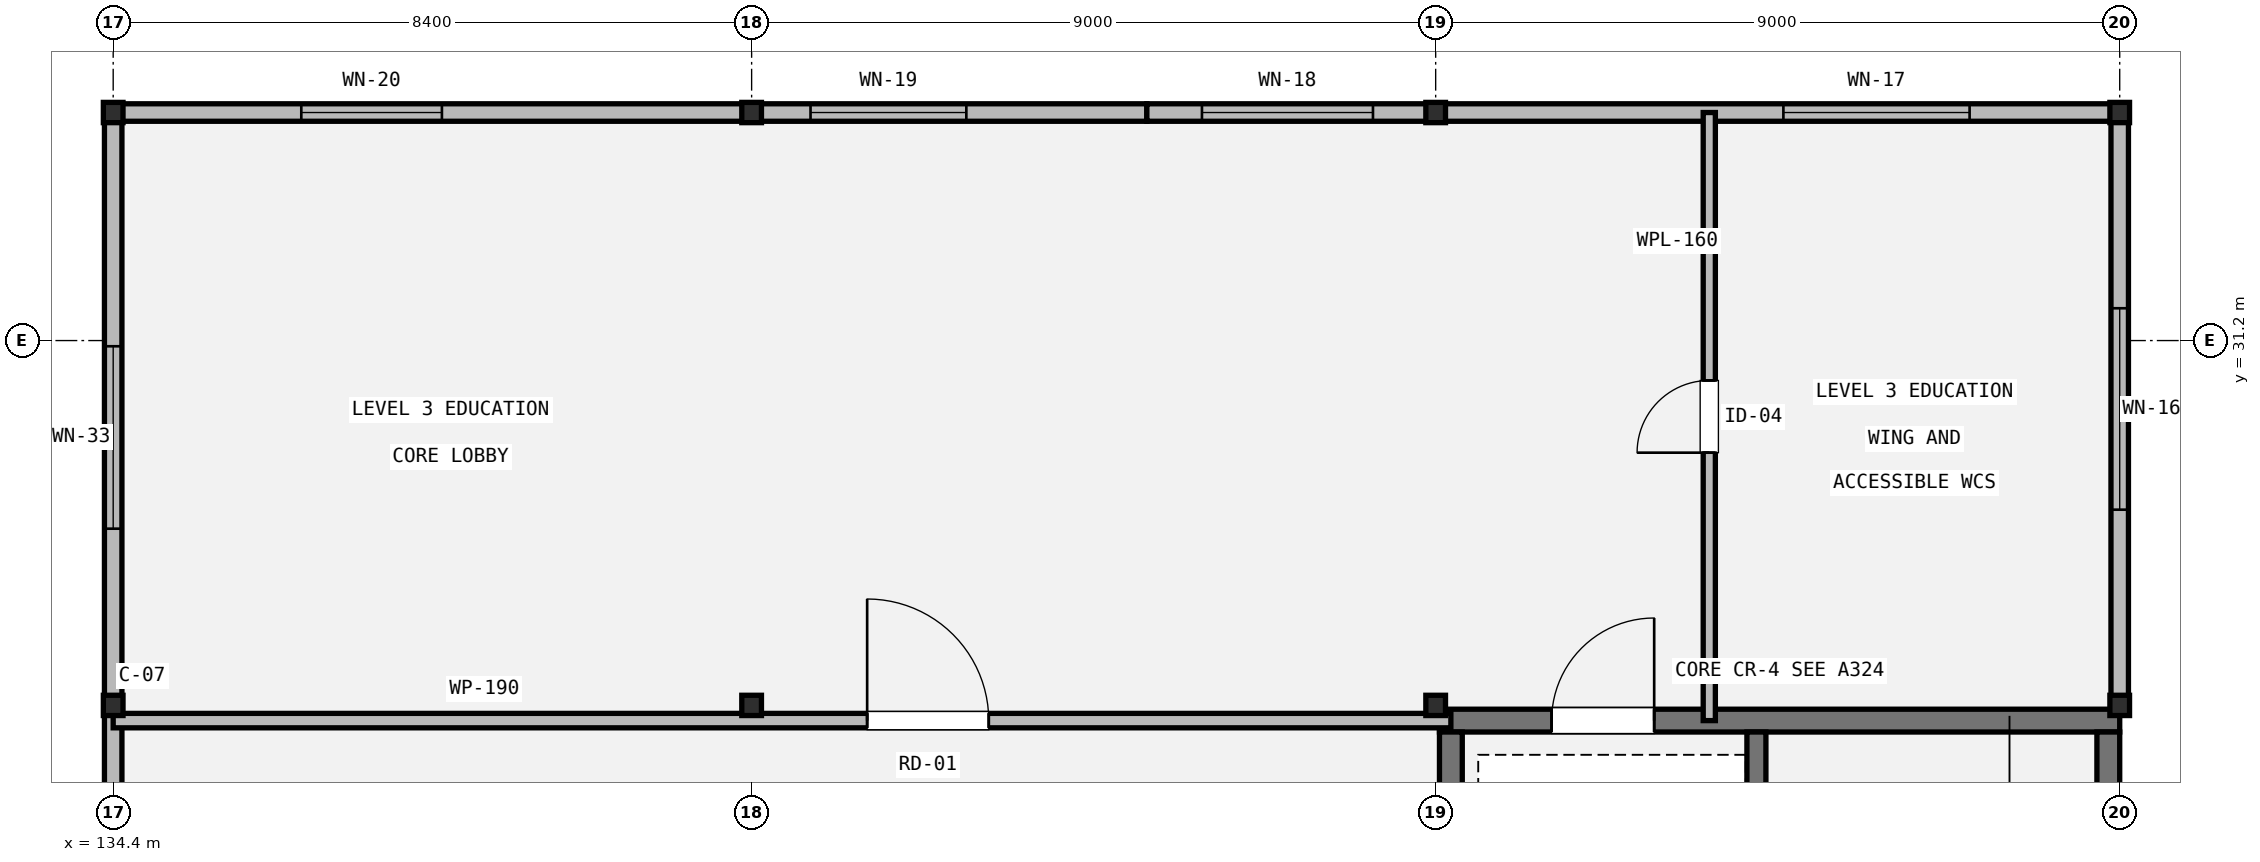
"""IFC4 building model, lengths in metres.
Left out: names, types, materials, properties, quantities, classifications, styles, units other than length and angle.
Written with IfcOpenShell. Run it as: python <this file> out.ifc"""

import sys

from ifc_helpers import new_model, si_unit, direction, frame, frame_2d, origin, origin_2d, place, context, subcontext, project, spatial, rectangle, i_section, extrude, element, fill, save


model = new_model("IFC4")
c1 = context("Model", 3, precision=1e-05, world=origin(), true_north=direction((0.0, 1.0)))
c2 = subcontext(c1, "Body", "Model", "MODEL_VIEW")
j1 = project(units=[si_unit("LENGTHUNIT", "METRE"), si_unit("PLANEANGLEUNIT", "RADIAN")], contexts=[c1])
p1 = place(None, origin())
s1 = spatial("IfcSite", under=j1, at=p1, CompositionType="ELEMENT")
p2 = place(p1, origin())
s2 = spatial("IfcBuilding", under=s1, at=p2, CompositionType="ELEMENT")
p3 = place(p2, frame((0.0, 0.0, 15.0)))
s3 = spatial("IfcBuildingStorey", under=s2, at=p3, CompositionType="ELEMENT", Elevation=15.0)
for number, where, z_axis, x_axis in (
    (1, (134.4, 26.4, 0.0), (0.0, 0.0, 1.0), (1.0, 0.0, 0.0)),
    (2, (134.4, 34.2, 0.0), (0.0, 0.0, 1.0), (1.0, 0.0, 0.0)),
    (3, (142.8, 26.4, 0.0), (0.0, 0.0, 1.0), (1.0, 0.0, 0.0)),
    (4, (142.8, 34.2, 0.0), (0.0, 0.0, 1.0), (1.0, 0.0, 0.0)),
    (5, (151.8, 26.4, 0.0), (0.0, 0.0, 1.0), (1.0, 0.0, 0.0)),
    (6, (151.8, 34.2, 0.0), (0.0, 0.0, 1.0), (1.0, 0.0, 0.0)),
    (7, (160.8, 26.4, 0.0), (0.0, 0.0, 1.0), (1.0, 0.0, 0.0)),
    (8, (160.8, 34.2, 0.0), (0.0, 0.0, 1.0), (1.0, 0.0, 0.0)),
):
    element("IfcColumn", number, at=place(p3, frame(where, z_axis=z_axis, x_axis=x_axis)), inside=s3, PredefinedType="COLUMN", context=c2, shape_type="SweptSolid", body=[
        extrude(i_section(OverallWidth=0.259, OverallDepth=0.267, WebThickness=0.013, FlangeThickness=0.021, FilletRadius=0.013, at=origin_2d()), origin(), (0.0, 0.0, 1.0), 4.2),
    ])
p4 = place(p3, frame((134.4, 17.1, 0.0), z_axis=(0.0, 0.0, 1.0), x_axis=(0.0, 1.0, 0.0)))
e9 = element("IfcWall", 9, at=p4, inside=s3, PredefinedType="STANDARD", context=c2, shape_type="SweptSolid", body=[
    extrude(rectangle(XDim=17.1, YDim=0.23, at=frame_2d((8.55, 0.0))), origin(), (0.0, 0.0, 1.0), 3.952),
])
p5 = place(p4, frame((3.2, 0.0, 0.9)))
e10 = element("IfcOpeningElement", 10, at=p5, cuts=e9, PredefinedType="OPENING", context=c2, shape_type="SweptSolid", body=[
    extrude(rectangle(XDim=2.15, YDim=1.65, at=frame_2d((1.075, 0.825))), frame((0.0, 0.125, 0.0), z_axis=(0.0, -1.0, 0.0), x_axis=(1.0, 0.0, 0.0)), (0.0, 0.0, 1.0), 0.25),
])
p6 = place(p4, frame((11.625, 0.0, 0.9)))
e11 = element("IfcOpeningElement", 11, at=p6, cuts=e9, PredefinedType="OPENING", context=c2, shape_type="SweptSolid", body=[
    extrude(rectangle(XDim=2.4, YDim=1.65, at=frame_2d((1.2, 0.825))), frame((0.0, 0.125, 0.0), z_axis=(0.0, -1.0, 0.0), x_axis=(1.0, 0.0, 0.0)), (0.0, 0.0, 1.0), 0.25),
])
p7 = place(p3, frame((134.4, 34.2, 0.0), z_axis=(0.0, 0.0, 1.0), x_axis=(1.0, 0.0, 0.0)))
e12 = element("IfcWall", 12, at=p7, inside=s3, PredefinedType="STANDARD", context=c2, shape_type="SweptSolid", body=[
    extrude(rectangle(XDim=13.6, YDim=0.23, at=frame_2d((6.8, 0.0))), origin(), (0.0, 0.0, 1.0), 3.952),
])
p8 = place(p7, frame((2.475, 0.0, 0.9)))
e13 = element("IfcOpeningElement", 13, at=p8, cuts=e12, PredefinedType="OPENING", context=c2, shape_type="SweptSolid", body=[
    extrude(rectangle(XDim=1.85, YDim=2.1, at=frame_2d((0.925, 1.05))), frame((0.0, 0.125, 0.0), z_axis=(0.0, -1.0, 0.0), x_axis=(1.0, 0.0, 0.0)), (0.0, 0.0, 1.0), 0.25),
])
p9 = place(p7, frame((9.175, 0.0, 0.9)))
e14 = element("IfcOpeningElement", 14, at=p9, cuts=e12, PredefinedType="OPENING", context=c2, shape_type="SweptSolid", body=[
    extrude(rectangle(XDim=2.05, YDim=2.1, at=frame_2d((1.025, 1.05))), frame((0.0, 0.125, 0.0), z_axis=(0.0, -1.0, 0.0), x_axis=(1.0, 0.0, 0.0)), (0.0, 0.0, 1.0), 0.25),
])
p10 = place(p3, frame((148.0, 34.2, 0.0), z_axis=(0.0, 0.0, 1.0), x_axis=(1.0, 0.0, 0.0)))
e15 = element("IfcWall", 15, at=p10, inside=s3, PredefinedType="STANDARD", context=c2, shape_type="SweptSolid", body=[
    extrude(rectangle(XDim=12.8, YDim=0.23, at=frame_2d((6.4, 0.0))), origin(), (0.0, 0.0, 1.0), 3.952),
])
p11 = place(p10, frame((0.725, 0.0, 0.9)))
e16 = element("IfcOpeningElement", 16, at=p11, cuts=e15, PredefinedType="OPENING", context=c2, shape_type="SweptSolid", body=[
    extrude(rectangle(XDim=2.25, YDim=2.1, at=frame_2d((1.125, 1.05))), frame((0.0, 0.125, 0.0), z_axis=(0.0, -1.0, 0.0), x_axis=(1.0, 0.0, 0.0)), (0.0, 0.0, 1.0), 0.25),
])
p12 = place(p10, frame((8.375, 0.0, 0.9)))
e17 = element("IfcOpeningElement", 17, at=p12, cuts=e15, PredefinedType="OPENING", context=c2, shape_type="SweptSolid", body=[
    extrude(rectangle(XDim=2.45, YDim=2.1, at=frame_2d((1.225, 1.05))), frame((0.0, 0.125, 0.0), z_axis=(0.0, -1.0, 0.0), x_axis=(1.0, 0.0, 0.0)), (0.0, 0.0, 1.0), 0.25),
])
p13 = place(p3, frame((160.8, 34.2, 0.0), z_axis=(0.0, 0.0, 1.0), x_axis=(0.0, -1.0, 0.0)))
e18 = element("IfcWall", 18, at=p13, inside=s3, PredefinedType="STANDARD", context=c2, shape_type="SweptSolid", body=[
    extrude(rectangle(XDim=7.8, YDim=0.23, at=frame_2d((3.9, 0.0))), origin(), (0.0, 0.0, 1.0), 3.952),
])
p14 = place(p13, frame((2.575, 0.0, 0.9)))
e19 = element("IfcOpeningElement", 19, at=p14, cuts=e18, PredefinedType="OPENING", context=c2, shape_type="SweptSolid", body=[
    extrude(rectangle(XDim=2.65, YDim=2.1, at=frame_2d((1.325, 1.05))), frame((0.0, 0.125, 0.0), z_axis=(0.0, -1.0, 0.0), x_axis=(1.0, 0.0, 0.0)), (0.0, 0.0, 1.0), 0.25),
])
p15 = place(p3, frame((151.85, 26.2, 0.0), z_axis=(0.0, 0.0, 1.0), x_axis=(1.0, 0.0, 0.0)))
e20 = element("IfcWall", 20, at=p15, inside=s3, PredefinedType="SHEAR", context=c2, shape_type="SweptSolid", body=[
    extrude(rectangle(XDim=8.95, YDim=0.3, at=frame_2d((4.475, 0.0))), origin(), (0.0, 0.0, 1.0), 4.0),
])
p16 = place(p15, frame((1.475, 0.0, 0.0)))
e21 = element("IfcOpeningElement", 21, at=p16, cuts=e20, PredefinedType="OPENING", context=c2, shape_type="SweptSolid", body=[
    extrude(rectangle(XDim=1.35, YDim=2.15, at=frame_2d((0.675, 1.075))), frame((0.0, 0.16, 0.0), z_axis=(0.0, -1.0, 0.0), x_axis=(1.0, 0.0, 0.0)), (0.0, 0.0, 1.0), 0.32),
])
for number, where, z_axis, x_axis in (
    (22, (152.0, 15.75, 0.0), (0.0, 0.0, 1.0), (0.0, 1.0, 0.0)),
    (23, (160.65, 26.05, 0.0), (0.0, 0.0, 1.0), (0.0, -1.0, 0.0)),
):
    element("IfcWall", number, at=place(p3, frame(where, z_axis=z_axis, x_axis=x_axis)), inside=s3, PredefinedType="SHEAR", context=c2, shape_type="SweptSolid", body=[
        extrude(rectangle(XDim=10.3, YDim=0.3, at=frame_2d((5.15, 0.0))), origin(), (0.0, 0.0, 1.0), 4.0),
    ])
p17 = place(p3, frame((156.02, 26.05, 0.0), z_axis=(0.0, 0.0, 1.0), x_axis=(0.0, -1.0, 0.0)))
e24 = element("IfcWall", 24, at=p17, inside=s3, PredefinedType="SHEAR", context=c2, shape_type="SweptSolid", body=[
    extrude(rectangle(XDim=10.3, YDim=0.25, at=frame_2d((5.15, 0.0))), origin(), (0.0, 0.0, 1.0), 4.0),
])
p18 = place(p17, frame((8.65, 0.0, 0.0)))
e25 = element("IfcOpeningElement", 25, at=p18, cuts=e24, PredefinedType="OPENING", context=c2, shape_type="SweptSolid", body=[
    extrude(rectangle(XDim=1.1, YDim=2.15, at=frame_2d((0.55, 1.075))), frame((0.0, 0.135, 0.0), z_axis=(0.0, -1.0, 0.0), x_axis=(1.0, 0.0, 0.0)), (0.0, 0.0, 1.0), 0.27),
])
p19 = place(p3, frame((134.4, 26.2, 0.0), z_axis=(0.0, 0.0, 1.0), x_axis=(1.0, 0.0, 0.0)))
e26 = element("IfcWall", 26, at=p19, inside=s3, PredefinedType="PARTITIONING", context=c2, shape_type="SweptSolid", body=[
    extrude(rectangle(XDim=17.6, YDim=0.19, at=frame_2d((8.8, 0.0))), origin(), (0.0, 0.0, 1.0), 3.952),
])
p20 = place(p19, frame((9.92, 0.0, 0.0)))
e27 = element("IfcOpeningElement", 27, at=p20, cuts=e26, PredefinedType="OPENING", context=c2, shape_type="SweptSolid", body=[
    extrude(rectangle(XDim=1.6, YDim=2.25, at=frame_2d((0.8, 1.125))), frame((0.0, 0.105, 0.0), z_axis=(0.0, -1.0, 0.0), x_axis=(1.0, 0.0, 0.0)), (0.0, 0.0, 1.0), 0.21),
])
p21 = place(p3, frame((155.4, 26.2, 0.0), z_axis=(0.0, 0.0, 1.0), x_axis=(0.0, 1.0, 0.0)))
e28 = element("IfcWall", 28, at=p21, inside=s3, PredefinedType="PLUMBINGWALL", context=c2, shape_type="SweptSolid", body=[
    extrude(rectangle(XDim=8.0, YDim=0.16, at=frame_2d((4.0, 0.0))), origin(), (0.0, 0.0, 1.0), 3.952),
])
p22 = place(p21, frame((3.525, 0.0, 0.0)))
e29 = element("IfcOpeningElement", 29, at=p22, cuts=e28, PredefinedType="OPENING", context=c2, shape_type="SweptSolid", body=[
    extrude(rectangle(XDim=0.95, YDim=2.1, at=frame_2d((0.475, 1.05))), frame((0.0, 0.09, 0.0), z_axis=(0.0, -1.0, 0.0), x_axis=(1.0, 0.0, 0.0)), (0.0, 0.0, 1.0), 0.18),
])
p23 = place(p6, origin())
e30 = element("IfcWindow", 30, at=p23, inside=s3, PartitioningType="SINGLE_PANEL", PredefinedType="WINDOW", context=c2, shape_type="SweptSolid", body=[
    extrude(rectangle(XDim=2.4, YDim=1.65, at=frame_2d((1.2, 0.825))), frame((0.0, 0.03, 0.0), z_axis=(0.0, -1.0, 0.0), x_axis=(1.0, 0.0, 0.0)), (0.0, 0.0, 1.0), 0.06),
])
fill(e11, e30)
p24 = place(p8, origin())
e31 = element("IfcWindow", 31, at=p24, inside=s3, PartitioningType="SINGLE_PANEL", PredefinedType="WINDOW", context=c2, shape_type="SweptSolid", body=[
    extrude(rectangle(XDim=1.85, YDim=2.1, at=frame_2d((0.925, 1.05))), frame((0.0, 0.03, 0.0), z_axis=(0.0, -1.0, 0.0), x_axis=(1.0, 0.0, 0.0)), (0.0, 0.0, 1.0), 0.06),
])
fill(e13, e31)
p25 = place(p9, origin())
e32 = element("IfcWindow", 32, at=p25, inside=s3, PartitioningType="SINGLE_PANEL", PredefinedType="WINDOW", context=c2, shape_type="SweptSolid", body=[
    extrude(rectangle(XDim=2.05, YDim=2.1, at=frame_2d((1.025, 1.05))), frame((0.0, 0.03, 0.0), z_axis=(0.0, -1.0, 0.0), x_axis=(1.0, 0.0, 0.0)), (0.0, 0.0, 1.0), 0.06),
])
fill(e14, e32)
p26 = place(p11, origin())
e33 = element("IfcWindow", 33, at=p26, inside=s3, PartitioningType="SINGLE_PANEL", PredefinedType="WINDOW", context=c2, shape_type="SweptSolid", body=[
    extrude(rectangle(XDim=2.25, YDim=2.1, at=frame_2d((1.125, 1.05))), frame((0.0, 0.03, 0.0), z_axis=(0.0, -1.0, 0.0), x_axis=(1.0, 0.0, 0.0)), (0.0, 0.0, 1.0), 0.06),
])
fill(e16, e33)
p27 = place(p12, origin())
e34 = element("IfcWindow", 34, at=p27, inside=s3, PartitioningType="SINGLE_PANEL", PredefinedType="WINDOW", context=c2, shape_type="SweptSolid", body=[
    extrude(rectangle(XDim=2.45, YDim=2.1, at=frame_2d((1.225, 1.05))), frame((0.0, 0.03, 0.0), z_axis=(0.0, -1.0, 0.0), x_axis=(1.0, 0.0, 0.0)), (0.0, 0.0, 1.0), 0.06),
])
fill(e17, e34)
p28 = place(p14, origin())
e35 = element("IfcWindow", 35, at=p28, inside=s3, PartitioningType="SINGLE_PANEL", PredefinedType="WINDOW", context=c2, shape_type="SweptSolid", body=[
    extrude(rectangle(XDim=2.65, YDim=2.1, at=frame_2d((1.325, 1.05))), frame((0.0, 0.03, 0.0), z_axis=(0.0, -1.0, 0.0), x_axis=(1.0, 0.0, 0.0)), (0.0, 0.0, 1.0), 0.06),
])
fill(e19, e35)
p29 = place(p16, origin())
e36 = element("IfcDoor", 36, at=p29, inside=s3, OperationType="SINGLE_SWING_RIGHT", PredefinedType="DOOR", context=c2, shape_type="SweptSolid", body=[
    extrude(rectangle(XDim=1.35, YDim=2.15, at=frame_2d((0.675, 1.075))), frame((0.0, 0.025, 0.0), z_axis=(0.0, -1.0, 0.0), x_axis=(1.0, 0.0, 0.0)), (0.0, 0.0, 1.0), 0.05),
])
fill(e21, e36)
p30 = place(p20, origin())
e37 = element("IfcDoor", 37, at=p30, inside=s3, OperationType="SINGLE_SWING_LEFT", PredefinedType="DOOR", context=c2, shape_type="SweptSolid", body=[
    extrude(rectangle(XDim=1.6, YDim=2.25, at=frame_2d((0.8, 1.125))), frame((0.0, 0.025, 0.0), z_axis=(0.0, -1.0, 0.0), x_axis=(1.0, 0.0, 0.0)), (0.0, 0.0, 1.0), 0.05),
])
fill(e27, e37)
p31 = place(p22, origin())
e38 = element("IfcDoor", 38, at=p31, inside=s3, OperationType="SINGLE_SWING_LEFT", PredefinedType="DOOR", context=c2, shape_type="SweptSolid", body=[
    extrude(rectangle(XDim=0.95, YDim=2.1, at=frame_2d((0.475, 1.05))), frame((0.0, 0.025, 0.0), z_axis=(0.0, -1.0, 0.0), x_axis=(1.0, 0.0, 0.0)), (0.0, 0.0, 1.0), 0.05),
])
fill(e29, e38)
save(model, sys.argv[1])
